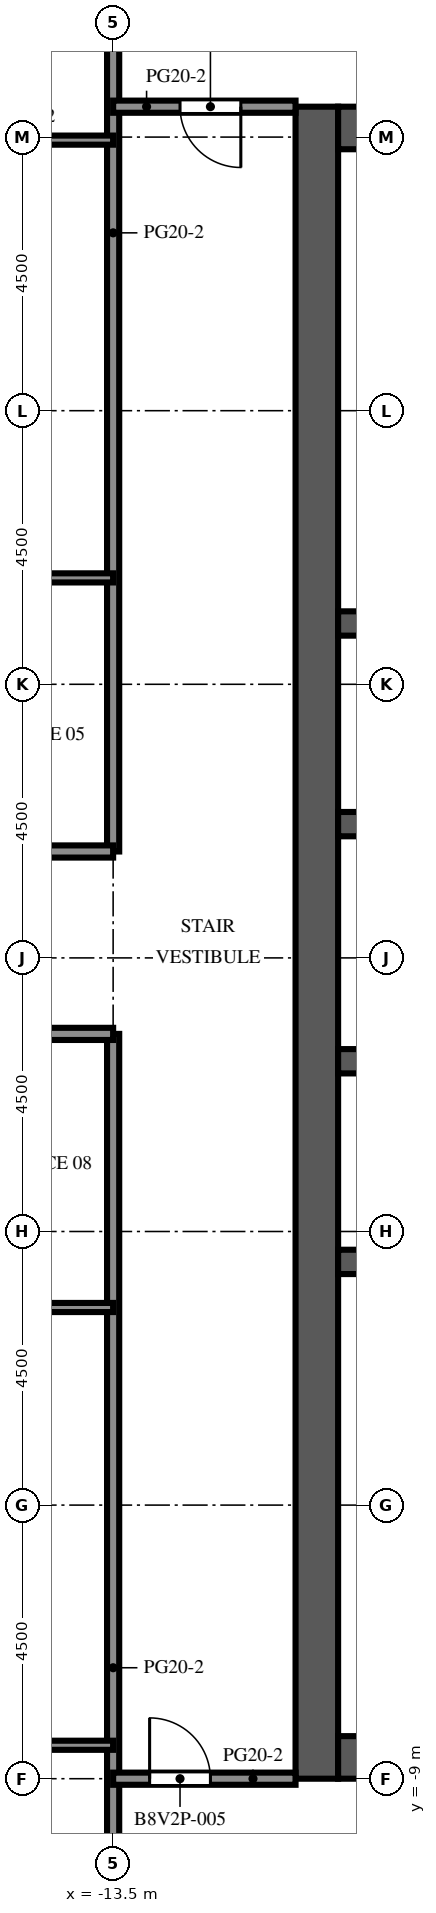
"""IFC4 building model, lengths in metres.
Left out: names, types, materials, properties, quantities, classifications, styles, units other than length and angle.
Written with IfcOpenShell. Run it as: python <this file> out.ifc"""

import sys

from ifc_helpers import new_model, si_unit, direction, frame, frame_2d, origin, place, context, subcontext, project, spatial, rectangle, extrude, element, fill, save


model = new_model("IFC4")
c1 = context("Model", 3, precision=1e-05, world=origin(), true_north=direction((0.0, 1.0)))
c2 = subcontext(c1, "Body", "Model", "MODEL_VIEW")
j1 = project(units=[si_unit("LENGTHUNIT", "METRE"), si_unit("PLANEANGLEUNIT", "RADIAN")], contexts=[c1])
p1 = place(None, origin())
s1 = spatial("IfcSite", under=j1, at=p1, CompositionType="ELEMENT")
p2 = place(p1, origin())
s2 = spatial("IfcBuilding", under=s1, at=p2, CompositionType="ELEMENT")
p3 = place(p2, frame((0.0, 0.0, 290.9)))
s3 = spatial("IfcBuildingStorey", under=s2, at=p3, CompositionType="ELEMENT", Elevation=290.9)
p4 = place(p3, frame((-10.15, -9.0, 0.0), z_axis=(0.0, 0.0, 1.0), x_axis=(0.0, 1.0, 0.0)))
e1 = element("IfcWall", 1, at=p4, inside=s3, PredefinedType="SHEAR", context=c2, shape_type="SweptSolid", body=[
    extrude(rectangle(XDim=27.5, YDim=0.7, at=frame_2d((13.75, 0.0))), origin(), (0.0, 0.0, 1.0), 4.1),
])
p5 = place(p4, frame((12.55, 0.0, 0.0)))
e2 = element("IfcOpeningElement", 2, at=p5, cuts=e1, PredefinedType="OPENING", context=c2, shape_type="SweptSolid", body=[
    extrude(rectangle(XDim=2.4, YDim=2.4, at=frame_2d((1.2, 1.2))), frame((0.0, 0.36, 0.0), z_axis=(0.0, -1.0, 0.0), x_axis=(1.0, 0.0, 0.0)), (0.0, 0.0, 1.0), 0.72),
])
p6 = place(p4, frame((6.825, 0.0, 0.0)))
e3 = element("IfcOpeningElement", 3, at=p6, cuts=e1, PredefinedType="OPENING", context=c2, shape_type="SweptSolid", body=[
    extrude(rectangle(XDim=1.2, YDim=2.1, at=frame_2d((0.6, 1.05))), frame((0.0, 0.36, 0.0), z_axis=(0.0, -1.0, 0.0), x_axis=(1.0, 0.0, 0.0)), (0.0, 0.0, 1.0), 0.72),
])
p7 = place(p4, frame((19.475, 0.0, 0.0)))
e4 = element("IfcOpeningElement", 4, at=p7, cuts=e1, PredefinedType="OPENING", context=c2, shape_type="SweptSolid", body=[
    extrude(rectangle(XDim=1.2, YDim=2.1, at=frame_2d((0.6, 1.05))), frame((0.0, 0.36, 0.0), z_axis=(0.0, -1.0, 0.0), x_axis=(1.0, 0.0, 0.0)), (0.0, 0.0, 1.0), 0.72),
])
for number, where, z_axis, x_axis in (
    (5, (-9.8, -8.65, 0.0), (0.0, 0.0, 1.0), (1.0, 0.0, 0.0)),
    (6, (-9.8, 18.15, 0.0), (0.0, 0.0, 1.0), (1.0, 0.0, 0.0)),
):
    element("IfcWall", number, at=place(p3, frame(where, z_axis=z_axis, x_axis=x_axis)), inside=s3, PredefinedType="SHEAR", context=c2, shape_type="SweptSolid", body=[
        extrude(rectangle(XDim=10.6, YDim=0.7, at=frame_2d((5.3, 0.0))), origin(), (0.0, 0.0, 1.0), 4.1),
    ])
p8 = place(p3, frame((-9.8, -0.5, 0.0), z_axis=(0.0, 0.0, 1.0), x_axis=(1.0, 0.0, 0.0)))
e7 = element("IfcWall", 7, at=p8, inside=s3, PredefinedType="SHEAR", context=c2, shape_type="SweptSolid", body=[
    extrude(rectangle(XDim=10.6, YDim=0.4, at=frame_2d((5.3, 0.0))), origin(), (0.0, 0.0, 1.0), 4.1),
])
p9 = place(p3, frame((-9.8, 2.8, 0.0), z_axis=(0.0, 0.0, 1.0), x_axis=(1.0, 0.0, 0.0)))
e8 = element("IfcWall", 8, at=p9, inside=s3, PredefinedType="SHEAR", context=c2, shape_type="SweptSolid", body=[
    extrude(rectangle(XDim=10.6, YDim=0.4, at=frame_2d((5.3, 0.0))), origin(), (0.0, 0.0, 1.0), 4.1),
])
p10 = place(p9, frame((0.688, 0.0, 0.0)))
e9 = element("IfcOpeningElement", 9, at=p10, cuts=e8, PredefinedType="OPENING", context=c2, shape_type="SweptSolid", body=[
    extrude(rectangle(XDim=1.1, YDim=2.1, at=frame_2d((0.55, 1.05))), frame((0.0, 0.21, 0.0), z_axis=(0.0, -1.0, 0.0), x_axis=(1.0, 0.0, 0.0)), (0.0, 0.0, 1.0), 0.42),
])
p11 = place(p9, frame((3.438, 0.0, 0.0)))
e10 = element("IfcOpeningElement", 10, at=p11, cuts=e8, PredefinedType="OPENING", context=c2, shape_type="SweptSolid", body=[
    extrude(rectangle(XDim=1.1, YDim=2.1, at=frame_2d((0.55, 1.05))), frame((0.0, 0.21, 0.0), z_axis=(0.0, -1.0, 0.0), x_axis=(1.0, 0.0, 0.0)), (0.0, 0.0, 1.0), 0.42),
])
p12 = place(p9, frame((6.113, 0.0, 0.0)))
e11 = element("IfcOpeningElement", 11, at=p12, cuts=e8, PredefinedType="OPENING", context=c2, shape_type="SweptSolid", body=[
    extrude(rectangle(XDim=1.0, YDim=2.1, at=frame_2d((0.5, 1.05))), frame((0.0, 0.21, 0.0), z_axis=(0.0, -1.0, 0.0), x_axis=(1.0, 0.0, 0.0)), (0.0, 0.0, 1.0), 0.42),
])
p13 = place(p9, frame((8.863, 0.0, 0.0)))
e12 = element("IfcOpeningElement", 12, at=p13, cuts=e8, PredefinedType="OPENING", context=c2, shape_type="SweptSolid", body=[
    extrude(rectangle(XDim=1.0, YDim=2.1, at=frame_2d((0.5, 1.05))), frame((0.0, 0.21, 0.0), z_axis=(0.0, -1.0, 0.0), x_axis=(1.0, 0.0, 0.0)), (0.0, 0.0, 1.0), 0.42),
])
p14 = place(p3, frame((-9.8, 6.7, 0.0), z_axis=(0.0, 0.0, 1.0), x_axis=(1.0, 0.0, 0.0)))
e13 = element("IfcWall", 13, at=p14, inside=s3, PredefinedType="SHEAR", context=c2, shape_type="SweptSolid", body=[
    extrude(rectangle(XDim=10.6, YDim=0.4, at=frame_2d((5.3, 0.0))), origin(), (0.0, 0.0, 1.0), 4.1),
])
p15 = place(p14, frame((3.438, 0.0, 0.0)))
e14 = element("IfcOpeningElement", 14, at=p15, cuts=e13, PredefinedType="OPENING", context=c2, shape_type="SweptSolid", body=[
    extrude(rectangle(XDim=1.1, YDim=2.1, at=frame_2d((0.55, 1.05))), frame((0.0, 0.21, 0.0), z_axis=(0.0, -1.0, 0.0), x_axis=(1.0, 0.0, 0.0)), (0.0, 0.0, 1.0), 0.42),
])
p16 = place(p14, frame((6.062, 0.0, 0.0)))
e15 = element("IfcOpeningElement", 15, at=p16, cuts=e13, PredefinedType="OPENING", context=c2, shape_type="SweptSolid", body=[
    extrude(rectangle(XDim=1.1, YDim=2.1, at=frame_2d((0.55, 1.05))), frame((0.0, 0.21, 0.0), z_axis=(0.0, -1.0, 0.0), x_axis=(1.0, 0.0, 0.0)), (0.0, 0.0, 1.0), 0.42),
])
p17 = place(p14, frame((8.812, 0.0, 0.0)))
e16 = element("IfcOpeningElement", 16, at=p17, cuts=e13, PredefinedType="OPENING", context=c2, shape_type="SweptSolid", body=[
    extrude(rectangle(XDim=1.1, YDim=2.1, at=frame_2d((0.55, 1.05))), frame((0.0, 0.21, 0.0), z_axis=(0.0, -1.0, 0.0), x_axis=(1.0, 0.0, 0.0)), (0.0, 0.0, 1.0), 0.42),
])
p18 = place(p14, frame((0.738, 0.0, 0.0)))
e17 = element("IfcOpeningElement", 17, at=p18, cuts=e13, PredefinedType="OPENING", context=c2, shape_type="SweptSolid", body=[
    extrude(rectangle(XDim=1.0, YDim=2.1, at=frame_2d((0.5, 1.05))), frame((0.0, 0.21, 0.0), z_axis=(0.0, -1.0, 0.0), x_axis=(1.0, 0.0, 0.0)), (0.0, 0.0, 1.0), 0.42),
])
p19 = place(p3, frame((-9.8, 10.0, 0.0), z_axis=(0.0, 0.0, 1.0), x_axis=(1.0, 0.0, 0.0)))
e18 = element("IfcWall", 18, at=p19, inside=s3, PredefinedType="SHEAR", context=c2, shape_type="SweptSolid", body=[
    extrude(rectangle(XDim=10.6, YDim=0.4, at=frame_2d((5.3, 0.0))), origin(), (0.0, 0.0, 1.0), 4.1),
])
p20 = place(p3, frame((-13.5, -17.6, 0.0), z_axis=(0.0, 0.0, 1.0), x_axis=(0.0, 1.0, 0.0)))
e19 = element("IfcWall", 19, at=p20, inside=s3, PredefinedType="PARTITIONING", context=c2, shape_type="SweptSolid", body=[
    extrude(rectangle(XDim=20.85, YDim=0.2, at=frame_2d((10.425, 0.0))), origin(), (0.0, 0.0, 1.0), 3.5),
])
p21 = place(p3, frame((-13.5, 6.25, 0.0), z_axis=(0.0, 0.0, 1.0), x_axis=(0.0, 1.0, 0.0)))
e20 = element("IfcWall", 20, at=p21, inside=s3, PredefinedType="PARTITIONING", context=c2, shape_type="SweptSolid", body=[
    extrude(rectangle(XDim=20.35, YDim=0.2, at=frame_2d((10.175, 0.0))), origin(), (0.0, 0.0, 1.0), 3.5),
])
p22 = place(p3, frame((-10.5, -9.0, 0.0), z_axis=(0.0, 0.0, 1.0), x_axis=(-1.0, 0.0, 0.0)))
e21 = element("IfcWall", 21, at=p22, inside=s3, PredefinedType="PARTITIONING", context=c2, shape_type="SweptSolid", body=[
    extrude(rectangle(XDim=3.0, YDim=0.2, at=frame_2d((1.5, 0.0))), origin(), (0.0, 0.0, 1.0), 3.5),
])
p23 = place(p22, frame((1.4, 0.0, 0.0)))
e22 = element("IfcOpeningElement", 22, at=p23, cuts=e21, PredefinedType="OPENING", context=c2, shape_type="SweptSolid", body=[
    extrude(rectangle(XDim=1.0, YDim=2.1, at=frame_2d((0.5, 1.05))), frame((0.0, 0.11, 0.0), z_axis=(0.0, -1.0, 0.0), x_axis=(1.0, 0.0, 0.0)), (0.0, 0.0, 1.0), 0.22),
])
p24 = place(p3, frame((-17.5, -8.45, 0.0), z_axis=(0.0, 0.0, 1.0), x_axis=(1.0, 0.0, 0.0)))
e23 = element("IfcWall", 23, at=p24, inside=s3, PredefinedType="PARTITIONING", context=c2, shape_type="SweptSolid", body=[
    extrude(rectangle(XDim=4.0, YDim=0.15, at=frame_2d((2.0, 0.0))), origin(), (0.0, 0.0, 1.0), 3.5),
])
p25 = place(p3, frame((-13.5, -1.25, 0.0), z_axis=(0.0, 0.0, 1.0), x_axis=(-1.0, 0.0, 0.0)))
e24 = element("IfcWall", 24, at=p25, inside=s3, PredefinedType="PARTITIONING", context=c2, shape_type="SweptSolid", body=[
    extrude(rectangle(XDim=8.85, YDim=0.15, at=frame_2d((4.425, 0.0))), origin(), (0.0, 0.0, 1.0), 3.5),
])
p26 = place(p25, frame((5.15, 0.0, 0.0)))
e25 = element("IfcOpeningElement", 25, at=p26, cuts=e24, PredefinedType="OPENING", context=c2, shape_type="SweptSolid", body=[
    extrude(rectangle(XDim=1.0, YDim=2.1, at=frame_2d((0.5, 1.05))), frame((0.0, 0.085, 0.0), z_axis=(0.0, -1.0, 0.0), x_axis=(1.0, 0.0, 0.0)), (0.0, 0.0, 1.0), 0.17),
])
p27 = place(p3, frame((-13.5, 3.25, 0.0), z_axis=(0.0, 0.0, 1.0), x_axis=(-1.0, 0.0, 0.0)))
e26 = element("IfcWall", 26, at=p27, inside=s3, PredefinedType="PARTITIONING", context=c2, shape_type="SweptSolid", body=[
    extrude(rectangle(XDim=8.85, YDim=0.2, at=frame_2d((4.425, 0.0))), origin(), (0.0, 0.0, 1.0), 3.5),
])
p28 = place(p27, frame((3.9, 0.0, 0.0)))
e27 = element("IfcOpeningElement", 27, at=p28, cuts=e26, PredefinedType="OPENING", context=c2, shape_type="SweptSolid", body=[
    extrude(rectangle(XDim=1.0, YDim=2.1, at=frame_2d((0.5, 1.05))), frame((0.0, 0.11, 0.0), z_axis=(0.0, -1.0, 0.0), x_axis=(1.0, 0.0, 0.0)), (0.0, 0.0, 1.0), 0.22),
])
p29 = place(p3, frame((-22.35, 6.25, 0.0), z_axis=(0.0, 0.0, 1.0), x_axis=(1.0, 0.0, 0.0)))
e28 = element("IfcWall", 28, at=p29, inside=s3, PredefinedType="PARTITIONING", context=c2, shape_type="SweptSolid", body=[
    extrude(rectangle(XDim=8.85, YDim=0.2, at=frame_2d((4.425, 0.0))), origin(), (0.0, 0.0, 1.0), 3.5),
])
p30 = place(p29, frame((2.95, 0.0, 0.0)))
e29 = element("IfcOpeningElement", 29, at=p30, cuts=e28, PredefinedType="OPENING", context=c2, shape_type="SweptSolid", body=[
    extrude(rectangle(XDim=1.0, YDim=2.1, at=frame_2d((0.5, 1.05))), frame((0.0, 0.11, 0.0), z_axis=(0.0, -1.0, 0.0), x_axis=(1.0, 0.0, 0.0)), (0.0, 0.0, 1.0), 0.22),
])
p31 = place(p3, frame((-22.35, 10.75, 0.0), z_axis=(0.0, 0.0, 1.0), x_axis=(1.0, 0.0, 0.0)))
e30 = element("IfcWall", 30, at=p31, inside=s3, PredefinedType="PARTITIONING", context=c2, shape_type="SweptSolid", body=[
    extrude(rectangle(XDim=8.85, YDim=0.15, at=frame_2d((4.425, 0.0))), origin(), (0.0, 0.0, 1.0), 3.5),
])
p32 = place(p31, frame((4.95, 0.0, 0.0)))
e31 = element("IfcOpeningElement", 31, at=p32, cuts=e30, PredefinedType="OPENING", context=c2, shape_type="SweptSolid", body=[
    extrude(rectangle(XDim=1.0, YDim=2.1, at=frame_2d((0.5, 1.05))), frame((0.0, 0.085, 0.0), z_axis=(0.0, -1.0, 0.0), x_axis=(1.0, 0.0, 0.0)), (0.0, 0.0, 1.0), 0.17),
])
p33 = place(p3, frame((-17.5, 17.95, 0.0), z_axis=(0.0, 0.0, 1.0), x_axis=(1.0, 0.0, 0.0)))
e32 = element("IfcWall", 32, at=p33, inside=s3, PredefinedType="PARTITIONING", context=c2, shape_type="SweptSolid", body=[
    extrude(rectangle(XDim=4.0, YDim=0.15, at=frame_2d((2.0, 0.0))), origin(), (0.0, 0.0, 1.0), 3.5),
])
p34 = place(p33, frame((0.1, 0.0, 0.0)))
e33 = element("IfcOpeningElement", 33, at=p34, cuts=e32, PredefinedType="OPENING", context=c2, shape_type="SweptSolid", body=[
    extrude(rectangle(XDim=1.0, YDim=2.1, at=frame_2d((0.5, 1.05))), frame((0.0, 0.085, 0.0), z_axis=(0.0, -1.0, 0.0), x_axis=(1.0, 0.0, 0.0)), (0.0, 0.0, 1.0), 0.17),
])
p35 = place(p3, frame((-13.5, 18.5, 0.0), z_axis=(0.0, 0.0, 1.0), x_axis=(1.0, 0.0, 0.0)))
e34 = element("IfcWall", 34, at=p35, inside=s3, PredefinedType="PARTITIONING", context=c2, shape_type="SweptSolid", body=[
    extrude(rectangle(XDim=3.0, YDim=0.2, at=frame_2d((1.5, 0.0))), origin(), (0.0, 0.0, 1.0), 3.5),
])
p36 = place(p35, frame((1.1, 0.0, 0.0)))
e35 = element("IfcOpeningElement", 35, at=p36, cuts=e34, PredefinedType="OPENING", context=c2, shape_type="SweptSolid", body=[
    extrude(rectangle(XDim=1.0, YDim=2.1, at=frame_2d((0.5, 1.05))), frame((0.0, 0.11, 0.0), z_axis=(0.0, -1.0, 0.0), x_axis=(1.0, 0.0, 0.0)), (0.0, 0.0, 1.0), 0.22),
])
p37 = place(p5, origin())
e36 = element("IfcDoor", 36, at=p37, inside=s3, OperationType="DOUBLE_DOOR_DOUBLE_SWING", PredefinedType="DOOR", context=c2, shape_type="SweptSolid", body=[
    extrude(rectangle(XDim=2.4, YDim=2.4, at=frame_2d((1.2, 1.2))), frame((0.0, 0.025, 0.0), z_axis=(0.0, -1.0, 0.0), x_axis=(1.0, 0.0, 0.0)), (0.0, 0.0, 1.0), 0.05),
])
fill(e2, e36)
p38 = place(p6, origin())
e37 = element("IfcDoor", 37, at=p38, inside=s3, OperationType="SINGLE_SWING_LEFT", PredefinedType="DOOR", context=c2, shape_type="SweptSolid", body=[
    extrude(rectangle(XDim=1.2, YDim=2.1, at=frame_2d((0.6, 1.05))), frame((0.0, 0.025, 0.0), z_axis=(0.0, -1.0, 0.0), x_axis=(1.0, 0.0, 0.0)), (0.0, 0.0, 1.0), 0.05),
])
fill(e3, e37)
p39 = place(p7, origin())
e38 = element("IfcDoor", 38, at=p39, inside=s3, OperationType="SINGLE_SWING_LEFT", PredefinedType="DOOR", context=c2, shape_type="SweptSolid", body=[
    extrude(rectangle(XDim=1.2, YDim=2.1, at=frame_2d((0.6, 1.05))), frame((0.0, 0.025, 0.0), z_axis=(0.0, -1.0, 0.0), x_axis=(1.0, 0.0, 0.0)), (0.0, 0.0, 1.0), 0.05),
])
fill(e4, e38)
p40 = place(p23, origin())
e39 = element("IfcDoor", 39, at=p40, inside=s3, OperationType="SINGLE_SWING_RIGHT", PredefinedType="DOOR", context=c2, shape_type="SweptSolid", body=[
    extrude(rectangle(XDim=1.0, YDim=2.1, at=frame_2d((0.5, 1.05))), frame((0.0, 0.025, 0.0), z_axis=(0.0, -1.0, 0.0), x_axis=(1.0, 0.0, 0.0)), (0.0, 0.0, 1.0), 0.05),
])
fill(e22, e39)
p41 = place(p36, origin())
e40 = element("IfcDoor", 40, at=p41, inside=s3, OperationType="SINGLE_SWING_RIGHT", PredefinedType="DOOR", context=c2, shape_type="SweptSolid", body=[
    extrude(rectangle(XDim=1.0, YDim=2.1, at=frame_2d((0.5, 1.05))), frame((0.0, 0.025, 0.0), z_axis=(0.0, -1.0, 0.0), x_axis=(1.0, 0.0, 0.0)), (0.0, 0.0, 1.0), 0.05),
])
fill(e35, e40)
save(model, sys.argv[1])
